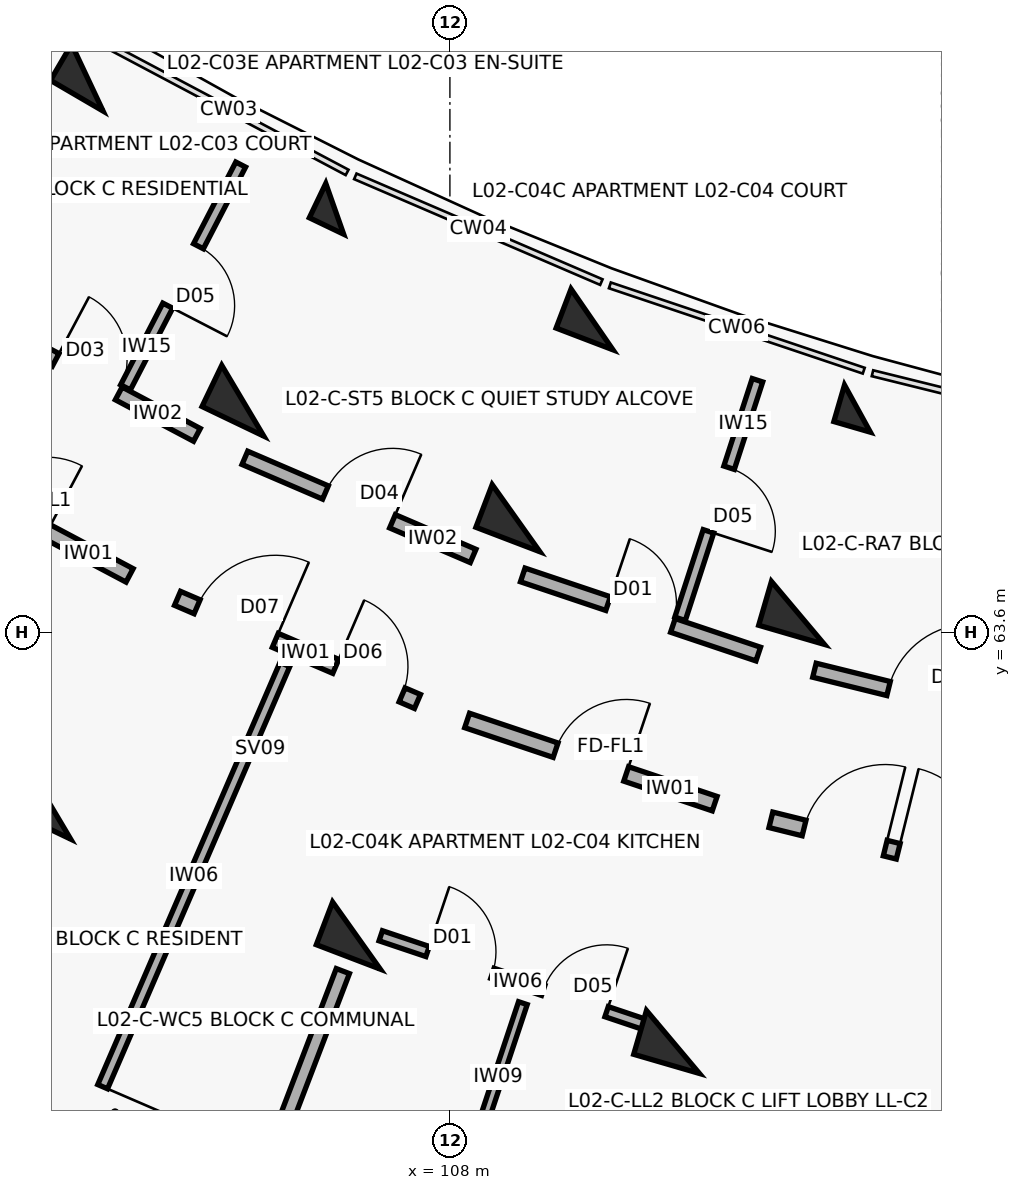
"""IFC4 building model, lengths in metres.
Left out: names, types, materials, properties, quantities, classifications, styles, units other than length and angle.
Written with IfcOpenShell. Run it as: python <this file> out.ifc"""

import sys

from ifc_helpers import new_model, si_unit, direction, frame, frame_2d, origin, origin_2d, place, context, subcontext, project, spatial, rectangle, extrude, element, fill, save


model = new_model("IFC4")
c1 = context("Model", 3, precision=1e-05, world=origin(), true_north=direction((0.0, 1.0)))
c2 = subcontext(c1, "Body", "Model", "MODEL_VIEW")
j1 = project(units=[si_unit("LENGTHUNIT", "METRE"), si_unit("PLANEANGLEUNIT", "RADIAN")], contexts=[c1])
p1 = place(None, origin())
s1 = spatial("IfcSite", under=j1, at=p1, CompositionType="ELEMENT")
p2 = place(p1, origin())
s2 = spatial("IfcBuilding", under=s1, at=p2, CompositionType="ELEMENT")
p3 = place(p2, frame((0.0, 0.0, 8.1)))
s3 = spatial("IfcBuildingStorey", under=s2, at=p3, CompositionType="ELEMENT", Elevation=8.1)
p4 = place(p3, frame((103.229, 70.896, 0.0), z_axis=(0.0, 0.0, 1.0), x_axis=(-0.504226211181, -0.863571611366, 0.0)))
e1 = element("IfcColumn", 1, at=p4, inside=s3, PredefinedType="COLUMN", context=c2, shape_type="SweptSolid", body=[
    extrude(rectangle(XDim=0.55, YDim=0.8, at=origin_2d()), origin(), (0.0, 0.0, 1.0), 3.1),
])
p5 = place(p3, frame((106.484, 69.169, 0.0), z_axis=(0.0, 0.0, 1.0), x_axis=(-0.432085748802, -0.901832526405, 0.0)))
e2 = element("IfcColumn", 2, at=p5, inside=s3, PredefinedType="COLUMN", context=c2, shape_type="SweptSolid", body=[
    extrude(rectangle(XDim=0.5, YDim=0.5, at=origin_2d()), origin(), (0.0, 0.0, 1.0), 3.1),
])
for number, where, z_axis, x_axis in (
    (3, (105.274, 66.644, 0.0), (0.0, 0.0, 1.0), (-0.432, -0.902, 0.0)),
    (4, (102.734, 61.341, 0.0), (0.0, 0.0, 1.0), (-0.432, -0.902, 0.0)),
):
    element("IfcColumn", number, at=place(p3, frame(where, z_axis=z_axis, x_axis=x_axis)), inside=s3, PredefinedType="COLUMN", context=c2, shape_type="SweptSolid", body=[
        extrude(rectangle(XDim=0.6, YDim=0.9, at=origin_2d()), origin(), (0.0, 0.0, 1.0), 3.1),
    ])
p6 = place(p3, frame((109.869, 67.714, 0.0), z_axis=(0.0, 0.0, 1.0), x_axis=(-0.357064076459, -0.934079892355, 0.0)))
e5 = element("IfcColumn", 5, at=p6, inside=s3, PredefinedType="COLUMN", context=c2, shape_type="SweptSolid", body=[
    extrude(rectangle(XDim=0.55, YDim=0.8, at=origin_2d()), origin(), (0.0, 0.0, 1.0), 3.1),
])
for number, where, z_axis, x_axis in (
    (6, (108.869, 65.099, 0.0), (0.0, 0.0, 1.0), (-0.357, -0.934, 0.0)),
    (7, (106.77, 59.606, 0.0), (0.0, 0.0, 1.0), (-0.357, -0.934, 0.0)),
):
    element("IfcColumn", number, at=place(p3, frame(where, z_axis=z_axis, x_axis=x_axis)), inside=s3, PredefinedType="COLUMN", context=c2, shape_type="SweptSolid", body=[
        extrude(rectangle(XDim=0.6, YDim=0.9, at=origin_2d()), origin(), (0.0, 0.0, 1.0), 3.1),
    ])
p7 = place(p3, frame((113.362, 66.54, 0.0), z_axis=(0.0, 0.0, 1.0), x_axis=(-0.27966144946, -0.96009867914, 0.0)))
e8 = element("IfcColumn", 8, at=p7, inside=s3, PredefinedType="COLUMN", context=c2, shape_type="SweptSolid", body=[
    extrude(rectangle(XDim=0.5, YDim=0.5, at=origin_2d()), origin(), (0.0, 0.0, 1.0), 3.1),
])
for number, where, z_axis, x_axis in (
    (9, (112.579, 63.852, 0.0), (0.0, 0.0, 1.0), (-0.28, -0.96, 0.0)),
    (10, (110.934, 58.207, 0.0), (0.0, 0.0, 1.0), (-0.28, -0.96, 0.0)),
):
    element("IfcColumn", number, at=place(p3, frame(where, z_axis=z_axis, x_axis=x_axis)), inside=s3, PredefinedType="COLUMN", context=c2, shape_type="SweptSolid", body=[
        extrude(rectangle(XDim=0.6, YDim=0.9, at=origin_2d()), origin(), (0.0, 0.0, 1.0), 3.1),
    ])
p8 = place(p3, frame((100.75, 65.956, 0.0), z_axis=(0.0, 0.0, 1.0), x_axis=(0.883440266101, -0.468543803963, 0.0)))
e11 = element("IfcWall", 11, at=p8, inside=s3, PredefinedType="SOLIDWALL", context=c2, shape_type="SweptSolid", body=[
    extrude(rectangle(XDim=3.436, YDim=0.2, at=frame_2d((1.718, 0.0))), origin(), (0.0, 0.0, 1.0), 2.08),
])
p9 = place(p8, frame((1.228, 0.0, 0.0)))
e12 = element("IfcOpeningElement", 12, at=p9, cuts=e11, PredefinedType="OPENING", context=c2, shape_type="SweptSolid", body=[
    extrude(rectangle(XDim=0.98, YDim=2.15, at=frame_2d((0.49, 1.075))), frame((0.0, 0.11, 0.0), z_axis=(0.0, -1.0, 0.0), x_axis=(1.0, 0.0, 0.0)), (0.0, 0.0, 1.0), 0.22),
])
p10 = place(p3, frame((101.784, 67.726, 0.0), z_axis=(0.0, 0.0, 1.0), x_axis=(0.883444301944, -0.468536194293, 0.0)))
e13 = element("IfcWall", 13, at=p10, inside=s3, PredefinedType="SOLIDWALL", context=c2, shape_type="SweptSolid", body=[
    extrude(rectangle(XDim=3.269, YDim=0.19, at=frame_2d((1.634, 0.0))), origin(), (0.0, 0.0, 1.0), 2.08),
])
p11 = place(p10, frame((1.164, 0.0, 0.0)))
e14 = element("IfcOpeningElement", 14, at=p11, cuts=e13, PredefinedType="OPENING", context=c2, shape_type="SweptSolid", body=[
    extrude(rectangle(XDim=0.94, YDim=2.1, at=frame_2d((0.47, 1.05))), frame((0.0, 0.105, 0.0), z_axis=(0.0, -1.0, 0.0), x_axis=(1.0, 0.0, 0.0)), (0.0, 0.0, 1.0), 0.21),
])
p12 = place(p3, frame((105.247, 69.752, 0.0), z_axis=(0.0, 0.0, 1.0), x_axis=(-0.459187433099, -0.888339406581, 0.0)))
e15 = element("IfcWall", 15, at=p12, inside=s3, PredefinedType="PARTITIONING", context=c2, shape_type="SweptSolid", body=[
    extrude(rectangle(XDim=3.3, YDim=0.145, at=frame_2d((1.65, 0.0))), origin(), (0.0, 0.0, 1.0), 2.08),
])
p13 = place(p12, frame((1.21, 0.0, 0.0)))
e16 = element("IfcOpeningElement", 16, at=p13, cuts=e15, PredefinedType="OPENING", context=c2, shape_type="SweptSolid", body=[
    extrude(rectangle(XDim=0.88, YDim=2.1, at=frame_2d((0.44, 1.05))), frame((0.0, 0.083, 0.0), z_axis=(0.0, -1.0, 0.0), x_axis=(1.0, 0.0, 0.0)), (0.0, 0.0, 1.0), 0.165),
])
p14 = place(p3, frame((104.417, 64.044, 0.0), z_axis=(0.0, 0.0, 1.0), x_axis=(0.918718172399, -0.394913813008, 0.0)))
e17 = element("IfcWall", 17, at=p14, inside=s3, PredefinedType="SOLIDWALL", context=c2, shape_type="SweptSolid", body=[
    extrude(rectangle(XDim=3.436, YDim=0.2, at=frame_2d((1.718, 0.0))), origin(), (0.0, 0.0, 1.0), 2.08),
])
p15 = place(p14, frame((0.28, 0.0, 0.0)))
e18 = element("IfcOpeningElement", 18, at=p15, cuts=e17, PredefinedType="OPENING", context=c2, shape_type="SweptSolid", body=[
    extrude(rectangle(XDim=1.12, YDim=2.15, at=frame_2d((0.56, 1.075))), frame((0.0, 0.11, 0.0), z_axis=(0.0, -1.0, 0.0), x_axis=(1.0, 0.0, 0.0)), (0.0, 0.0, 1.0), 0.22),
])
p16 = place(p14, frame((2.266, 0.0, 0.0)))
e19 = element("IfcOpeningElement", 19, at=p16, cuts=e17, PredefinedType="OPENING", context=c2, shape_type="SweptSolid", body=[
    extrude(rectangle(XDim=0.95, YDim=2.1, at=frame_2d((0.475, 1.05))), frame((0.0, 0.11, 0.0), z_axis=(0.0, -1.0, 0.0), x_axis=(1.0, 0.0, 0.0)), (0.0, 0.0, 1.0), 0.22),
])
p17 = place(p3, frame((105.302, 65.893, 0.0), z_axis=(0.0, 0.0, 1.0), x_axis=(0.918723391052, -0.394901672235, 0.0)))
e20 = element("IfcWall", 20, at=p17, inside=s3, PredefinedType="SOLIDWALL", context=c2, shape_type="SweptSolid", body=[
    extrude(rectangle(XDim=3.269, YDim=0.19, at=frame_2d((1.634, 0.0))), origin(), (0.0, 0.0, 1.0), 2.08),
])
p18 = place(p17, frame((1.154, 0.0, 0.0)))
e21 = element("IfcOpeningElement", 21, at=p18, cuts=e20, PredefinedType="OPENING", context=c2, shape_type="SweptSolid", body=[
    extrude(rectangle(XDim=0.96, YDim=2.1, at=frame_2d((0.48, 1.05))), frame((0.0, 0.105, 0.0), z_axis=(0.0, -1.0, 0.0), x_axis=(1.0, 0.0, 0.0)), (0.0, 0.0, 1.0), 0.21),
])
p19 = place(p3, frame((105.829, 63.173, 0.0), z_axis=(0.0, 0.0, 1.0), x_axis=(-0.396278945437, -0.91813016365, 0.0)))
e22 = element("IfcWall", 22, at=p19, inside=s3, PredefinedType="PARTITIONING", context=c2, shape_type="SweptSolid", body=[
    extrude(rectangle(XDim=7.95, YDim=0.14, at=frame_2d((3.975, 0.0))), origin(), (0.0, 0.0, 1.0), 2.08),
])
p20 = place(p19, frame((6.05, 0.0, 0.0)))
e23 = element("IfcOpeningElement", 23, at=p20, cuts=e22, PredefinedType="OPENING", context=c2, shape_type="SweptSolid", body=[
    extrude(rectangle(XDim=0.92, YDim=2.1, at=frame_2d((0.46, 1.05))), frame((0.0, 0.08, 0.0), z_axis=(0.0, -1.0, 0.0), x_axis=(1.0, 0.0, 0.0)), (0.0, 0.0, 1.0), 0.16),
])
p21 = place(p3, frame((108.227, 62.437, 0.0), z_axis=(0.0, 0.0, 1.0), x_axis=(0.947884468821, -0.318614239745, 0.0)))
e24 = element("IfcWall", 24, at=p21, inside=s3, PredefinedType="SOLIDWALL", context=c2, shape_type="SweptSolid", body=[
    extrude(rectangle(XDim=3.436, YDim=0.2, at=frame_2d((1.718, 0.0))), origin(), (0.0, 0.0, 1.0), 2.08),
])
p22 = place(p21, frame((1.228, 0.0, 0.0)))
e25 = element("IfcOpeningElement", 25, at=p22, cuts=e24, PredefinedType="OPENING", context=c2, shape_type="SweptSolid", body=[
    extrude(rectangle(XDim=0.98, YDim=2.15, at=frame_2d((0.49, 1.075))), frame((0.0, 0.11, 0.0), z_axis=(0.0, -1.0, 0.0), x_axis=(1.0, 0.0, 0.0)), (0.0, 0.0, 1.0), 0.22),
])
p23 = place(p3, frame((108.958, 64.352, 0.0), z_axis=(0.0, 0.0, 1.0), x_axis=(0.94787351033, -0.318646839643, 0.0)))
e26 = element("IfcWall", 26, at=p23, inside=s3, PredefinedType="SOLIDWALL", context=c2, shape_type="SweptSolid", body=[
    extrude(rectangle(XDim=3.269, YDim=0.19, at=frame_2d((1.634, 0.0))), origin(), (0.0, 0.0, 1.0), 2.08),
])
p24 = place(p23, frame((1.184, 0.0, 0.0)))
e27 = element("IfcOpeningElement", 27, at=p24, cuts=e26, PredefinedType="OPENING", context=c2, shape_type="SweptSolid", body=[
    extrude(rectangle(XDim=0.9, YDim=2.1, at=frame_2d((0.45, 1.05))), frame((0.0, 0.105, 0.0), z_axis=(0.0, -1.0, 0.0), x_axis=(1.0, 0.0, 0.0)), (0.0, 0.0, 1.0), 0.21),
])
p25 = place(p3, frame((112.046, 66.914, 0.0), z_axis=(0.0, 0.0, 1.0), x_axis=(-0.308582493915, -0.951197584337, 0.0)))
e28 = element("IfcWall", 28, at=p25, inside=s3, PredefinedType="PARTITIONING", context=c2, shape_type="SweptSolid", body=[
    extrude(rectangle(XDim=3.3, YDim=0.145, at=frame_2d((1.65, 0.0))), origin(), (0.0, 0.0, 1.0), 2.08),
])
p26 = place(p25, frame((1.21, 0.0, 0.0)))
e29 = element("IfcOpeningElement", 29, at=p26, cuts=e28, PredefinedType="OPENING", context=c2, shape_type="SweptSolid", body=[
    extrude(rectangle(XDim=0.88, YDim=2.1, at=frame_2d((0.44, 1.05))), frame((0.0, 0.083, 0.0), z_axis=(0.0, -1.0, 0.0), x_axis=(1.0, 0.0, 0.0)), (0.0, 0.0, 1.0), 0.165),
])
p27 = place(p3, frame((107.09, 59.604, 0.0), z_axis=(0.0, 0.0, 1.0), x_axis=(0.947873924847, -0.318645606584, 0.0)))
e30 = element("IfcWall", 30, at=p27, inside=s3, PredefinedType="PARTITIONING", context=c2, shape_type="SweptSolid", body=[
    extrude(rectangle(XDim=3.785, YDim=0.14, at=frame_2d((1.893, 0.0))), origin(), (0.0, 0.0, 1.0), 2.08),
])
p28 = place(p27, frame((0.65, 0.0, 0.0)))
e31 = element("IfcOpeningElement", 31, at=p28, cuts=e30, PredefinedType="OPENING", context=c2, shape_type="SweptSolid", body=[
    extrude(rectangle(XDim=0.9, YDim=2.1, at=frame_2d((0.45, 1.05))), frame((0.0, 0.08, 0.0), z_axis=(0.0, -1.0, 0.0), x_axis=(1.0, 0.0, 0.0)), (0.0, 0.0, 1.0), 0.16),
])
p29 = place(p27, frame((2.255, 0.0, 0.0)))
e32 = element("IfcOpeningElement", 32, at=p29, cuts=e30, PredefinedType="OPENING", context=c2, shape_type="SweptSolid", body=[
    extrude(rectangle(XDim=0.88, YDim=2.1, at=frame_2d((0.44, 1.05))), frame((0.0, 0.08, 0.0), z_axis=(0.0, -1.0, 0.0), x_axis=(1.0, 0.0, 0.0)), (0.0, 0.0, 1.0), 0.16),
])
p30 = place(p3, frame((108.96, 58.718, 0.0), z_axis=(0.0, 0.0, 1.0), x_axis=(-0.315778138239, -0.948833055606, 0.0)))
e33 = element("IfcWall", 33, at=p30, inside=s3, PredefinedType="PARTITIONING", context=c2, shape_type="SweptSolid", body=[
    extrude(rectangle(XDim=5.05, YDim=0.12, at=frame_2d((2.525, 0.0))), origin(), (0.0, 0.0, 1.0), 2.08),
])
p31 = place(p30, frame((2.06, 0.0, 0.0)))
e34 = element("IfcOpeningElement", 34, at=p31, cuts=e33, PredefinedType="OPENING", context=c2, shape_type="SweptSolid", body=[
    extrude(rectangle(XDim=0.93, YDim=2.1, at=frame_2d((0.465, 1.05))), frame((0.0, 0.07, 0.0), z_axis=(0.0, -1.0, 0.0), x_axis=(1.0, 0.0, 0.0)), (0.0, 0.0, 1.0), 0.14),
])
p32 = place(p3, frame((106.591, 59.139, 0.0), z_axis=(0.0, 0.0, 1.0), x_axis=(-0.357064016205, -0.934079915388, 0.0)))
e35 = element("IfcWall", 35, at=p32, inside=s3, PredefinedType="SOLIDWALL", context=c2, shape_type="SweptSolid", body=[
    extrude(rectangle(XDim=4.35, YDim=0.185, at=frame_2d((2.175, 0.0))), origin(), (0.0, 0.0, 1.0), 2.08),
])
p33 = place(p3, frame((112.223, 61.13, 0.0), z_axis=(0.0, 0.0, 1.0), x_axis=(0.970719238682, -0.240216901263, 0.0)))
e36 = element("IfcWall", 36, at=p33, inside=s3, PredefinedType="SOLIDWALL", context=c2, shape_type="SweptSolid", body=[
    extrude(rectangle(XDim=3.296, YDim=0.21, at=frame_2d((1.648, 0.0))), origin(), (0.0, 0.0, 1.0), 2.08),
])
p34 = place(p33, frame((0.45, 0.0, 0.0)))
e37 = element("IfcOpeningElement", 37, at=p34, cuts=e36, PredefinedType="OPENING", context=c2, shape_type="SweptSolid", body=[
    extrude(rectangle(XDim=1.1, YDim=2.15, at=frame_2d((0.55, 1.075))), frame((0.0, 0.115, 0.0), z_axis=(0.0, -1.0, 0.0), x_axis=(1.0, 0.0, 0.0)), (0.0, 0.0, 1.0), 0.23),
])
p35 = place(p33, frame((1.726, 0.0, 0.0)))
e38 = element("IfcOpeningElement", 38, at=p35, cuts=e36, PredefinedType="OPENING", context=c2, shape_type="SweptSolid", body=[
    extrude(rectangle(XDim=1.12, YDim=2.15, at=frame_2d((0.56, 1.075))), frame((0.0, 0.115, 0.0), z_axis=(0.0, -1.0, 0.0), x_axis=(1.0, 0.0, 0.0)), (0.0, 0.0, 1.0), 0.23),
])
p36 = place(p3, frame((112.796, 63.098, 0.0), z_axis=(0.0, 0.0, 1.0), x_axis=(0.970708998014, -0.240258280136, 0.0)))
e39 = element("IfcWall", 39, at=p36, inside=s3, PredefinedType="SOLIDWALL", context=c2, shape_type="SweptSolid", body=[
    extrude(rectangle(XDim=3.129, YDim=0.19, at=frame_2d((1.564, 0.0))), origin(), (0.0, 0.0, 1.0), 2.08),
])
p37 = place(p36, frame((1.004, 0.0, 0.0)))
e40 = element("IfcOpeningElement", 40, at=p37, cuts=e39, PredefinedType="OPENING", context=c2, shape_type="SweptSolid", body=[
    extrude(rectangle(XDim=1.12, YDim=2.15, at=frame_2d((0.56, 1.075))), frame((0.0, 0.105, 0.0), z_axis=(0.0, -1.0, 0.0), x_axis=(1.0, 0.0, 0.0)), (0.0, 0.0, 1.0), 0.21),
])
p38 = place(p11, origin())
e41 = element("IfcDoor", 41, at=p38, inside=s3, OperationType="SINGLE_SWING_LEFT", PredefinedType="DOOR", context=c2, shape_type="SweptSolid", body=[
    extrude(rectangle(XDim=0.94, YDim=2.1, at=frame_2d((0.47, 1.05))), frame((0.0, 0.025, 0.0), z_axis=(0.0, -1.0, 0.0), x_axis=(1.0, 0.0, 0.0)), (0.0, 0.0, 1.0), 0.05),
])
fill(e14, e41)
p39 = place(p13, origin())
e42 = element("IfcDoor", 42, at=p39, inside=s3, OperationType="SINGLE_SWING_RIGHT", PredefinedType="DOOR", context=c2, shape_type="SweptSolid", body=[
    extrude(rectangle(XDim=0.88, YDim=2.1, at=frame_2d((0.44, 1.05))), frame((0.0, 0.025, 0.0), z_axis=(0.0, -1.0, 0.0), x_axis=(1.0, 0.0, 0.0)), (0.0, 0.0, 1.0), 0.05),
])
fill(e16, e42)
p40 = place(p15, origin())
e43 = element("IfcDoor", 43, at=p40, inside=s3, OperationType="SINGLE_SWING_RIGHT", PredefinedType="DOOR", context=c2, shape_type="SweptSolid", body=[
    extrude(rectangle(XDim=1.12, YDim=2.15, at=frame_2d((0.56, 1.075))), frame((0.0, 0.025, 0.0), z_axis=(0.0, -1.0, 0.0), x_axis=(1.0, 0.0, 0.0)), (0.0, 0.0, 1.0), 0.05),
])
fill(e18, e43)
p41 = place(p16, origin())
e44 = element("IfcDoor", 44, at=p41, inside=s3, OperationType="SINGLE_SWING_LEFT", PredefinedType="DOOR", context=c2, shape_type="SweptSolid", body=[
    extrude(rectangle(XDim=0.95, YDim=2.1, at=frame_2d((0.475, 1.05))), frame((0.0, 0.025, 0.0), z_axis=(0.0, -1.0, 0.0), x_axis=(1.0, 0.0, 0.0)), (0.0, 0.0, 1.0), 0.05),
])
fill(e19, e44)
p42 = place(p18, origin())
e45 = element("IfcDoor", 45, at=p42, inside=s3, OperationType="SINGLE_SWING_RIGHT", PredefinedType="DOOR", context=c2, shape_type="SweptSolid", body=[
    extrude(rectangle(XDim=0.96, YDim=2.1, at=frame_2d((0.48, 1.05))), frame((0.0, 0.025, 0.0), z_axis=(0.0, -1.0, 0.0), x_axis=(1.0, 0.0, 0.0)), (0.0, 0.0, 1.0), 0.05),
])
fill(e21, e45)
p43 = place(p20, origin())
e46 = element("IfcDoor", 46, at=p43, inside=s3, OperationType="SINGLE_SWING_LEFT", PredefinedType="DOOR", context=c2, shape_type="SweptSolid", body=[
    extrude(rectangle(XDim=0.92, YDim=2.1, at=frame_2d((0.46, 1.05))), frame((0.0, 0.025, 0.0), z_axis=(0.0, -1.0, 0.0), x_axis=(1.0, 0.0, 0.0)), (0.0, 0.0, 1.0), 0.05),
])
fill(e23, e46)
p44 = place(p22, origin())
e47 = element("IfcDoor", 47, at=p44, inside=s3, OperationType="SINGLE_SWING_RIGHT", PredefinedType="DOOR", context=c2, shape_type="SweptSolid", body=[
    extrude(rectangle(XDim=0.98, YDim=2.15, at=frame_2d((0.49, 1.075))), frame((0.0, 0.025, 0.0), z_axis=(0.0, -1.0, 0.0), x_axis=(1.0, 0.0, 0.0)), (0.0, 0.0, 1.0), 0.05),
])
fill(e25, e47)
p45 = place(p24, origin())
e48 = element("IfcDoor", 48, at=p45, inside=s3, OperationType="SINGLE_SWING_LEFT", PredefinedType="DOOR", context=c2, shape_type="SweptSolid", body=[
    extrude(rectangle(XDim=0.9, YDim=2.1, at=frame_2d((0.45, 1.05))), frame((0.0, 0.025, 0.0), z_axis=(0.0, -1.0, 0.0), x_axis=(1.0, 0.0, 0.0)), (0.0, 0.0, 1.0), 0.05),
])
fill(e27, e48)
p46 = place(p26, origin())
e49 = element("IfcDoor", 49, at=p46, inside=s3, OperationType="SINGLE_SWING_RIGHT", PredefinedType="DOOR", context=c2, shape_type="SweptSolid", body=[
    extrude(rectangle(XDim=0.88, YDim=2.1, at=frame_2d((0.44, 1.05))), frame((0.0, 0.025, 0.0), z_axis=(0.0, -1.0, 0.0), x_axis=(1.0, 0.0, 0.0)), (0.0, 0.0, 1.0), 0.05),
])
fill(e29, e49)
p47 = place(p28, origin())
e50 = element("IfcDoor", 50, at=p47, inside=s3, OperationType="SINGLE_SWING_LEFT", PredefinedType="DOOR", context=c2, shape_type="SweptSolid", body=[
    extrude(rectangle(XDim=0.9, YDim=2.1, at=frame_2d((0.45, 1.05))), frame((0.0, 0.025, 0.0), z_axis=(0.0, -1.0, 0.0), x_axis=(1.0, 0.0, 0.0)), (0.0, 0.0, 1.0), 0.05),
])
fill(e31, e50)
p48 = place(p29, origin())
e51 = element("IfcDoor", 51, at=p48, inside=s3, OperationType="SINGLE_SWING_RIGHT", PredefinedType="DOOR", context=c2, shape_type="SweptSolid", body=[
    extrude(rectangle(XDim=0.88, YDim=2.1, at=frame_2d((0.44, 1.05))), frame((0.0, 0.025, 0.0), z_axis=(0.0, -1.0, 0.0), x_axis=(1.0, 0.0, 0.0)), (0.0, 0.0, 1.0), 0.05),
])
fill(e32, e51)
p49 = place(p34, origin())
e52 = element("IfcDoor", 52, at=p49, inside=s3, OperationType="SINGLE_SWING_RIGHT", PredefinedType="DOOR", context=c2, shape_type="SweptSolid", body=[
    extrude(rectangle(XDim=1.1, YDim=2.15, at=frame_2d((0.55, 1.075))), frame((0.0, 0.025, 0.0), z_axis=(0.0, -1.0, 0.0), x_axis=(1.0, 0.0, 0.0)), (0.0, 0.0, 1.0), 0.05),
])
fill(e37, e52)
p50 = place(p35, origin())
e53 = element("IfcDoor", 53, at=p50, inside=s3, OperationType="SINGLE_SWING_LEFT", PredefinedType="DOOR", context=c2, shape_type="SweptSolid", body=[
    extrude(rectangle(XDim=1.12, YDim=2.15, at=frame_2d((0.56, 1.075))), frame((0.0, 0.025, 0.0), z_axis=(0.0, -1.0, 0.0), x_axis=(1.0, 0.0, 0.0)), (0.0, 0.0, 1.0), 0.05),
])
fill(e38, e53)
p51 = place(p37, origin())
e54 = element("IfcDoor", 54, at=p51, inside=s3, OperationType="SINGLE_SWING_RIGHT", PredefinedType="DOOR", context=c2, shape_type="SweptSolid", body=[
    extrude(rectangle(XDim=1.12, YDim=2.15, at=frame_2d((0.56, 1.075))), frame((0.0, 0.025, 0.0), z_axis=(0.0, -1.0, 0.0), x_axis=(1.0, 0.0, 0.0)), (0.0, 0.0, 1.0), 0.05),
])
fill(e40, e54)
save(model, sys.argv[1])
